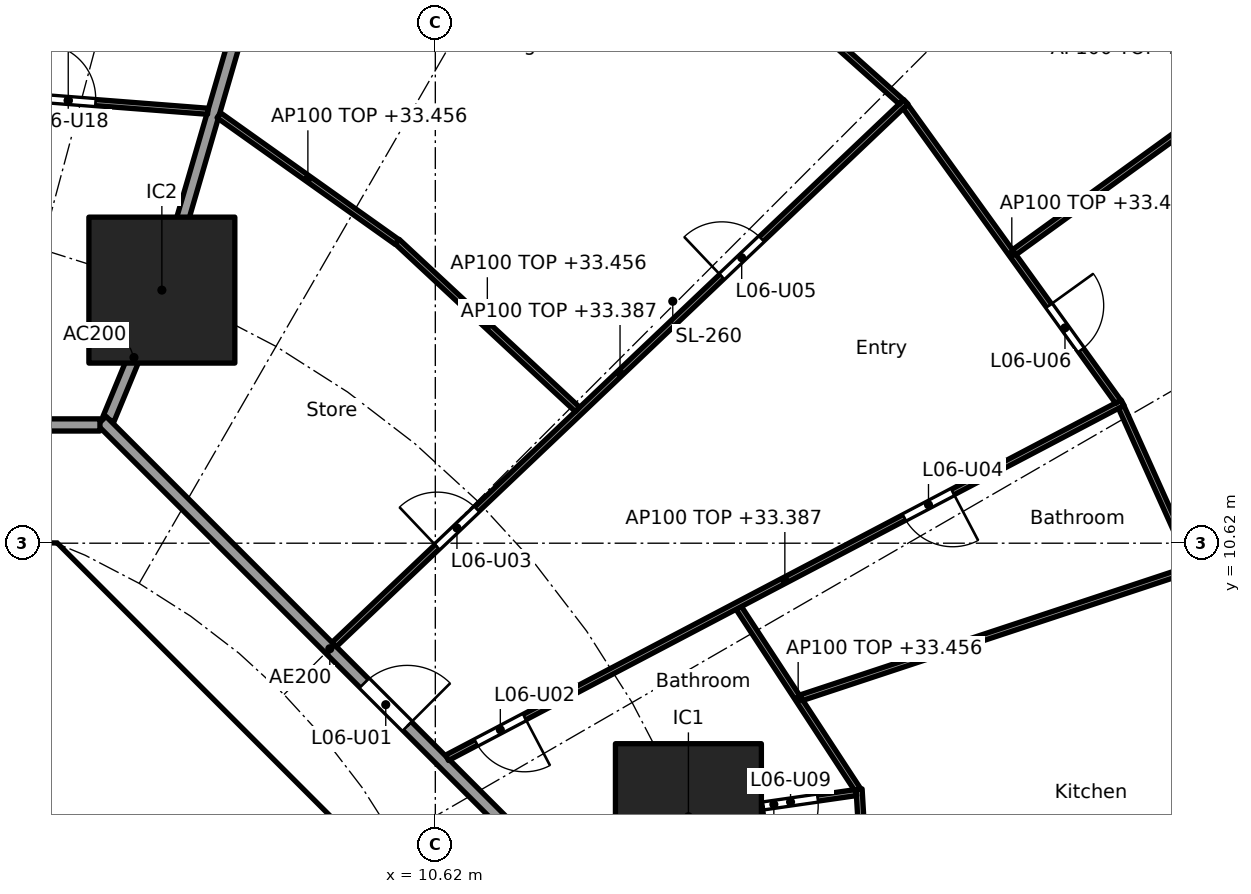
"""IFC4 building model, lengths in metres.
Left out: names, types, materials, properties, quantities, classifications, styles, units other than length and angle.
Written with IfcOpenShell. Run it as: python <this file> out.ifc"""

import sys

from ifc_helpers import new_model, si_unit, direction, frame, frame_2d, origin, origin_2d, place, context, subcontext, project, spatial, polyline, rectangle, outline, extrude, element, fill, save


model = new_model("IFC4")
c1 = context("Model", 3, precision=1e-05, world=origin(), true_north=direction((0.0, 1.0)))
c2 = subcontext(c1, "Body", "Model", "MODEL_VIEW")
j1 = project(units=[si_unit("LENGTHUNIT", "METRE"), si_unit("PLANEANGLEUNIT", "RADIAN")], contexts=[c1])
p1 = place(None, origin())
s1 = spatial("IfcSite", under=j1, at=p1, CompositionType="ELEMENT")
p2 = place(p1, origin())
s2 = spatial("IfcBuilding", under=s1, at=p2, CompositionType="ELEMENT")
p3 = place(p2, frame((0.0, 0.0, 30.7)))
s3 = spatial("IfcBuildingStorey", under=s2, at=p3, CompositionType="ELEMENT", Elevation=30.7)
for number, where, z_axis, x_axis in (
    (1, (14.782, 6.123, 0.0), (0.0, 0.0, 1.0), (1.0, 0.0, 0.0)),
    (2, (6.123, 14.782, 0.0), (0.0, 0.0, 1.0), (1.0, 0.0, 0.0)),
):
    element("IfcColumn", number, at=place(p3, frame(where, z_axis=z_axis, x_axis=x_axis)), inside=s3, PredefinedType="COLUMN", context=c2, shape_type="SweptSolid", body=[
        extrude(rectangle(XDim=2.4, YDim=2.4, at=origin_2d()), origin(), (0.0, 0.0, 1.0), 3.7),
    ])
p4 = place(p3, frame((9.988, 4.613, 0.0), z_axis=(0.0, 0.0, 1.0), x_axis=(-0.707106781187, 0.707106781187, 0.0)))
e3 = element("IfcWall", 3, at=p4, inside=s3, PredefinedType="SHEAR", context=c2, shape_type="SweptSolid", body=[
    extrude(rectangle(XDim=7.602, YDim=0.6, at=frame_2d((3.801, 0.0))), origin(), (0.0, 0.0, 1.0), 3.44),
])
p5 = place(p4, frame((3.201, 0.0, 0.0)))
e4 = element("IfcOpeningElement", 4, at=p5, cuts=e3, PredefinedType="OPENING", context=c2, shape_type="SweptSolid", body=[
    extrude(rectangle(XDim=1.2, YDim=2.1, at=frame_2d((0.6, 1.05))), frame((0.0, 0.31, 0.0), z_axis=(0.0, -1.0, 0.0), x_axis=(1.0, 0.0, 0.0)), (0.0, 0.0, 1.0), 0.62),
])
p6 = place(p3, origin())
e5 = element("IfcWall", 5, at=p6, inside=s3, PredefinedType="SHEAR", context=c2, shape_type="SweptSolid", body=[
    extrude(outline(polyline([(-4.152, 10.025), (-4.401, 9.776), (-4.825, 10.2), (-4.401, 10.625), (4.401, 10.625), (4.825, 10.2), (4.401, 9.776), (4.152, 10.025), (-4.152, 10.025)])), origin(), (0.0, 0.0, 1.0), 3.44),
])
p7 = place(p3, frame((5.243, 12.657, 0.0), z_axis=(0.0, 0.0, 1.0), x_axis=(0.382707856524, 0.923869415315, 0.0)))
e6 = element("IfcWall", 6, at=p7, inside=s3, PredefinedType="PARTITIONING", context=c2, shape_type="SweptSolid", body=[
    extrude(rectangle(XDim=2.2, YDim=0.2, at=frame_2d((1.1, 0.0))), origin(), (0.0, 0.0, 1.0), 3.44),
])
p8 = place(p3, frame((6.137, 14.83, 0.0), z_axis=(0.0, 0.0, 1.0), x_axis=(0.27985745069, 0.960041565399, 0.0)))
e7 = element("IfcWall", 7, at=p8, inside=s3, PredefinedType="PARTITIONING", context=c2, shape_type="SweptSolid", body=[
    extrude(rectangle(XDim=16.705, YDim=0.2, at=frame_2d((8.353, 0.0))), origin(), (0.0, 0.0, 1.0), 2.756),
])
p9 = place(p3, frame((12.635, 5.134, 0.0), z_axis=(0.0, 0.0, 1.0), x_axis=(-0.707106781187, 0.707106781187, 0.0)))
e8 = element("IfcWall", 8, at=p9, inside=s3, PredefinedType="PARTITIONING", context=c2, shape_type="SweptSolid", body=[
    extrude(rectangle(XDim=10.609, YDim=0.2, at=frame_2d((5.305, 0.0))), origin(), (0.0, 0.0, 1.0), 3.44),
])
p10 = place(p9, frame((3.503, 0.0, 0.0)))
e9 = element("IfcOpeningElement", 9, at=p10, cuts=e8, PredefinedType="OPENING", context=c2, shape_type="SweptSolid", body=[
    extrude(rectangle(XDim=1.0, YDim=2.1, at=frame_2d((0.5, 1.05))), frame((0.0, 0.11, 0.0), z_axis=(0.0, -1.0, 0.0), x_axis=(1.0, 0.0, 0.0)), (0.0, 0.0, 1.0), 0.22),
])
p11 = place(p3, frame((5.104, 12.565, 0.0), z_axis=(0.0, 0.0, 1.0), x_axis=(-1.0, 0.0, 0.0)))
e10 = element("IfcWall", 10, at=p11, inside=s3, PredefinedType="PARTITIONING", context=c2, shape_type="SweptSolid", body=[
    extrude(rectangle(XDim=10.409, YDim=0.2, at=frame_2d((5.205, 0.0))), origin(), (0.0, 0.0, 1.0), 3.44),
])
p12 = place(p11, frame((6.339, 0.0, 0.0)))
e11 = element("IfcOpeningElement", 11, at=p12, cuts=e10, PredefinedType="OPENING", context=c2, shape_type="SweptSolid", body=[
    extrude(rectangle(XDim=1.0, YDim=2.1, at=frame_2d((0.5, 1.05))), frame((0.0, 0.11, 0.0), z_axis=(0.0, -1.0, 0.0), x_axis=(1.0, 0.0, 0.0)), (0.0, 0.0, 1.0), 0.22),
])
p13 = place(p3, frame((17.971, 0.05, 0.0), z_axis=(0.0, 0.0, 1.0), x_axis=(-0.058476853647, 0.998288764631, 0.0)))
e12 = element("IfcWall", 12, at=p13, inside=s3, PredefinedType="PARTITIONING", context=c2, shape_type="SweptSolid", body=[
    extrude(rectangle(XDim=6.538, YDim=0.1, at=frame_2d((3.269, 0.0))), origin(), (0.0, 0.0, 1.0), 2.756),
])
p14 = place(p13, frame((1.159, 0.0, 0.0)))
e13 = element("IfcOpeningElement", 13, at=p14, cuts=e12, PredefinedType="OPENING", context=c2, shape_type="SweptSolid", body=[
    extrude(rectangle(XDim=0.9, YDim=2.1, at=frame_2d((0.45, 1.05))), frame((0.0, 0.06, 0.0), z_axis=(0.0, -1.0, 0.0), x_axis=(1.0, 0.0, 0.0)), (0.0, 0.0, 1.0), 0.12),
])
p15 = place(p3, frame((14.832, 6.13, 0.0), z_axis=(0.0, 0.0, 1.0), x_axis=(0.989840446863, 0.142182593007, 0.0)))
e14 = element("IfcWall", 14, at=p15, inside=s3, PredefinedType="PARTITIONING", context=c2, shape_type="SweptSolid", body=[
    extrude(rectangle(XDim=2.739, YDim=0.1, at=frame_2d((1.369, 0.0))), origin(), (0.0, 0.0, 1.0), 3.44),
])
p16 = place(p15, frame((1.197, 0.0, 0.0)))
e15 = element("IfcOpeningElement", 15, at=p16, cuts=e14, PredefinedType="OPENING", context=c2, shape_type="SweptSolid", body=[
    extrude(rectangle(XDim=0.9, YDim=2.1, at=frame_2d((0.45, 1.05))), frame((0.0, 0.06, 0.0), z_axis=(0.0, -1.0, 0.0), x_axis=(1.0, 0.0, 0.0)), (0.0, 0.0, 1.0), 0.12),
])
p17 = place(p3, frame((17.564, 6.569, 0.0), z_axis=(0.0, 0.0, 1.0), x_axis=(-0.547641765292, 0.836712911881, 0.0)))
e16 = element("IfcWall", 16, at=p17, inside=s3, PredefinedType="PARTITIONING", context=c2, shape_type="SweptSolid", body=[
    extrude(rectangle(XDim=3.57, YDim=0.1, at=frame_2d((1.785, 0.0))), origin(), (0.0, 0.0, 1.0), 2.756),
])
p18 = place(p3, frame((24.293, 7.538, 0.0), z_axis=(0.0, 0.0, 1.0), x_axis=(-0.410197710154, 0.911996622025, 0.0)))
e17 = element("IfcWall", 17, at=p18, inside=s3, PredefinedType="PARTITIONING", context=c2, shape_type="SweptSolid", body=[
    extrude(rectangle(XDim=5.837, YDim=0.1, at=frame_2d((2.918, 0.0))), origin(), (0.0, 0.0, 1.0), 2.756),
])
p19 = place(p3, frame((16.635, 8.078, 0.0), z_axis=(0.0, 0.0, 1.0), x_axis=(0.949412285442, 0.314032342684, 0.0)))
e18 = element("IfcWall", 18, at=p19, inside=s3, PredefinedType="PARTITIONING", context=c2, shape_type="SweptSolid", body=[
    extrude(rectangle(XDim=14.451, YDim=0.1, at=frame_2d((7.226, 0.0))), origin(), (0.0, 0.0, 1.0), 2.837),
])
p20 = place(p3, frame((10.813, 7.091, 0.0), z_axis=(0.0, 0.0, 1.0), x_axis=(0.885182649479, 0.465243674928, 0.0)))
e19 = element("IfcWall", 19, at=p20, inside=s3, PredefinedType="PARTITIONING", context=c2, shape_type="SweptSolid", body=[
    extrude(rectangle(XDim=12.551, YDim=0.1, at=frame_2d((6.275, 0.0))), origin(), (0.0, 0.0, 1.0), 2.687),
])
p21 = place(p20, frame((0.539, 0.0, 0.0)))
e20 = element("IfcOpeningElement", 20, at=p21, cuts=e19, PredefinedType="OPENING", context=c2, shape_type="SweptSolid", body=[
    extrude(rectangle(XDim=0.9, YDim=2.1, at=frame_2d((0.45, 1.05))), frame((0.0, 0.06, 0.0), z_axis=(0.0, -1.0, 0.0), x_axis=(1.0, 0.0, 0.0)), (0.0, 0.0, 1.0), 0.12),
])
p22 = place(p20, frame((8.494, 0.0, 0.0)))
e21 = element("IfcOpeningElement", 21, at=p22, cuts=e19, PredefinedType="OPENING", context=c2, shape_type="SweptSolid", body=[
    extrude(rectangle(XDim=0.9, YDim=2.1, at=frame_2d((0.45, 1.05))), frame((0.0, 0.06, 0.0), z_axis=(0.0, -1.0, 0.0), x_axis=(1.0, 0.0, 0.0)), (0.0, 0.0, 1.0), 0.12),
])
p23 = place(p3, frame((21.849, 12.948, 0.0), z_axis=(0.0, 0.0, 1.0), x_axis=(-0.584563700282, 0.811347817099, 0.0)))
e22 = element("IfcWall", 22, at=p23, inside=s3, PredefinedType="PARTITIONING", context=c2, shape_type="SweptSolid", body=[
    extrude(rectangle(XDim=5.984, YDim=0.1, at=frame_2d((2.992, 0.0))), origin(), (0.0, 0.0, 1.0), 2.756),
])
p24 = place(p23, frame((1.046, 0.0, 0.0)))
e23 = element("IfcOpeningElement", 23, at=p24, cuts=e22, PredefinedType="OPENING", context=c2, shape_type="SweptSolid", body=[
    extrude(rectangle(XDim=0.9, YDim=2.1, at=frame_2d((0.45, 1.05))), frame((0.0, 0.06, 0.0), z_axis=(0.0, -1.0, 0.0), x_axis=(1.0, 0.0, 0.0)), (0.0, 0.0, 1.0), 0.12),
])
p25 = place(p3, frame((20.141, 15.405, 0.0), z_axis=(0.0, 0.0, 1.0), x_axis=(0.809834895779, 0.58665785734, 0.0)))
e24 = element("IfcWall", 24, at=p25, inside=s3, PredefinedType="PARTITIONING", context=c2, shape_type="SweptSolid", body=[
    extrude(rectangle(XDim=7.945, YDim=0.1, at=frame_2d((3.973, 0.0))), origin(), (0.0, 0.0, 1.0), 2.837),
])
p26 = place(p3, frame((8.957, 8.953, 0.0), z_axis=(0.0, 0.0, 1.0), x_axis=(0.725250022034, 0.688485588476, 0.0)))
e25 = element("IfcWall", 25, at=p26, inside=s3, PredefinedType="PARTITIONING", context=c2, shape_type="SweptSolid", body=[
    extrude(rectangle(XDim=12.963, YDim=0.1, at=frame_2d((6.481, 0.0))), origin(), (0.0, 0.0, 1.0), 2.687),
])
p27 = place(p26, frame((2.333, 0.0, 0.0)))
e26 = element("IfcOpeningElement", 26, at=p27, cuts=e25, PredefinedType="OPENING", context=c2, shape_type="SweptSolid", body=[
    extrude(rectangle(XDim=0.9, YDim=2.1, at=frame_2d((0.45, 1.05))), frame((0.0, 0.06, 0.0), z_axis=(0.0, -1.0, 0.0), x_axis=(1.0, 0.0, 0.0)), (0.0, 0.0, 1.0), 0.12),
])
p28 = place(p26, frame((8.79, 0.0, 0.0)))
e27 = element("IfcOpeningElement", 27, at=p28, cuts=e25, PredefinedType="OPENING", context=c2, shape_type="SweptSolid", body=[
    extrude(rectangle(XDim=0.9, YDim=2.1, at=frame_2d((0.45, 1.05))), frame((0.0, 0.06, 0.0), z_axis=(0.0, -1.0, 0.0), x_axis=(1.0, 0.0, 0.0)), (0.0, 0.0, 1.0), 0.12),
])
p29 = place(p3, frame((12.958, 12.82, 0.0), z_axis=(0.0, 0.0, 1.0), x_axis=(-0.732028724098, 0.681273768096, 0.0)))
e28 = element("IfcWall", 28, at=p29, inside=s3, PredefinedType="PARTITIONING", context=c2, shape_type="SweptSolid", body=[
    extrude(rectangle(XDim=4.05, YDim=0.1, at=frame_2d((2.025, 0.0))), origin(), (0.0, 0.0, 1.0), 2.756),
])
p30 = place(p3, frame((18.285, 17.877, 0.0), z_axis=(0.0, 0.0, 1.0), x_axis=(-0.745806142791, 0.666163041136, 0.0)))
e29 = element("IfcWall", 29, at=p30, inside=s3, PredefinedType="PARTITIONING", context=c2, shape_type="SweptSolid", body=[
    extrude(rectangle(XDim=5.831, YDim=0.1, at=frame_2d((2.915, 0.0))), origin(), (0.0, 0.0, 1.0), 2.756),
])
p31 = place(p30, frame((2.465, 0.0, 0.0)))
e30 = element("IfcOpeningElement", 30, at=p31, cuts=e29, PredefinedType="OPENING", context=c2, shape_type="SweptSolid", body=[
    extrude(rectangle(XDim=0.9, YDim=2.1, at=frame_2d((0.45, 1.05))), frame((0.0, 0.06, 0.0), z_axis=(0.0, -1.0, 0.0), x_axis=(1.0, 0.0, 0.0)), (0.0, 0.0, 1.0), 0.12),
])
p32 = place(p3, frame((9.989, 15.574, 0.0), z_axis=(0.0, 0.0, 1.0), x_axis=(-0.81492039338, 0.57957290521, 0.0)))
e31 = element("IfcWall", 31, at=p32, inside=s3, PredefinedType="PARTITIONING", context=c2, shape_type="SweptSolid", body=[
    extrude(rectangle(XDim=3.594, YDim=0.1, at=frame_2d((1.797, 0.0))), origin(), (0.0, 0.0, 1.0), 2.756),
])
p33 = place(p3, frame((6.878, 17.723, 0.0), z_axis=(0.0, 0.0, 1.0), x_axis=(-0.99701850123, 0.077162868047, 0.0)))
e32 = element("IfcWall", 32, at=p33, inside=s3, PredefinedType="PARTITIONING", context=c2, shape_type="SweptSolid", body=[
    extrude(rectangle(XDim=4.604, YDim=0.1, at=frame_2d((2.302, 0.0))), origin(), (0.0, 0.0, 1.0), 2.756),
])
p34 = place(p33, frame((1.852, 0.0, 0.0)))
e33 = element("IfcOpeningElement", 33, at=p34, cuts=e32, PredefinedType="OPENING", context=c2, shape_type="SweptSolid", body=[
    extrude(rectangle(XDim=0.9, YDim=2.1, at=frame_2d((0.45, 1.05))), frame((0.0, 0.06, 0.0), z_axis=(0.0, -1.0, 0.0), x_axis=(1.0, 0.0, 0.0)), (0.0, 0.0, 1.0), 0.12),
])
p35 = place(p5, origin())
e34 = element("IfcDoor", 34, at=p35, inside=s3, OperationType="SINGLE_SWING_RIGHT", PredefinedType="DOOR", context=c2, shape_type="SweptSolid", body=[
    extrude(rectangle(XDim=1.2, YDim=2.1, at=frame_2d((0.6, 1.05))), frame((0.0, 0.025, 0.0), z_axis=(0.0, -1.0, 0.0), x_axis=(1.0, 0.0, 0.0)), (0.0, 0.0, 1.0), 0.05),
])
fill(e4, e34)
p36 = place(p10, frame((1.0, 0.0, 0.0), x_axis=(-1.0, 0.0, 0.0)))
e35 = element("IfcDoor", 35, at=p36, inside=s3, OperationType="SINGLE_SWING_RIGHT", PredefinedType="DOOR", context=c2, shape_type="SweptSolid", body=[
    extrude(rectangle(XDim=1.0, YDim=2.1, at=frame_2d((0.5, 1.05))), frame((0.0, 0.025, 0.0), z_axis=(0.0, -1.0, 0.0), x_axis=(1.0, 0.0, 0.0)), (0.0, 0.0, 1.0), 0.05),
])
fill(e9, e35)
p37 = place(p21, frame((0.9, 0.0, 0.0), x_axis=(-1.0, 0.0, 0.0)))
e36 = element("IfcDoor", 36, at=p37, inside=s3, OperationType="SINGLE_SWING_LEFT", PredefinedType="DOOR", context=c2, shape_type="SweptSolid", body=[
    extrude(rectangle(XDim=0.9, YDim=2.1, at=frame_2d((0.45, 1.05))), frame((0.0, 0.025, 0.0), z_axis=(0.0, -1.0, 0.0), x_axis=(1.0, 0.0, 0.0)), (0.0, 0.0, 1.0), 0.05),
])
fill(e20, e36)
p38 = place(p27, origin())
e37 = element("IfcDoor", 37, at=p38, inside=s3, OperationType="SINGLE_SWING_LEFT", PredefinedType="DOOR", context=c2, shape_type="SweptSolid", body=[
    extrude(rectangle(XDim=0.9, YDim=2.1, at=frame_2d((0.45, 1.05))), frame((0.0, 0.025, 0.0), z_axis=(0.0, -1.0, 0.0), x_axis=(1.0, 0.0, 0.0)), (0.0, 0.0, 1.0), 0.05),
])
fill(e26, e37)
p39 = place(p22, frame((0.9, 0.0, 0.0), x_axis=(-1.0, 0.0, 0.0)))
e38 = element("IfcDoor", 38, at=p39, inside=s3, OperationType="SINGLE_SWING_LEFT", PredefinedType="DOOR", context=c2, shape_type="SweptSolid", body=[
    extrude(rectangle(XDim=0.9, YDim=2.1, at=frame_2d((0.45, 1.05))), frame((0.0, 0.025, 0.0), z_axis=(0.0, -1.0, 0.0), x_axis=(1.0, 0.0, 0.0)), (0.0, 0.0, 1.0), 0.05),
])
fill(e21, e38)
p40 = place(p28, origin())
e39 = element("IfcDoor", 39, at=p40, inside=s3, OperationType="SINGLE_SWING_LEFT", PredefinedType="DOOR", context=c2, shape_type="SweptSolid", body=[
    extrude(rectangle(XDim=0.9, YDim=2.1, at=frame_2d((0.45, 1.05))), frame((0.0, 0.025, 0.0), z_axis=(0.0, -1.0, 0.0), x_axis=(1.0, 0.0, 0.0)), (0.0, 0.0, 1.0), 0.05),
])
fill(e27, e39)
p41 = place(p24, frame((0.9, 0.0, 0.0), x_axis=(-1.0, 0.0, 0.0)))
e40 = element("IfcDoor", 40, at=p41, inside=s3, OperationType="SINGLE_SWING_LEFT", PredefinedType="DOOR", context=c2, shape_type="SweptSolid", body=[
    extrude(rectangle(XDim=0.9, YDim=2.1, at=frame_2d((0.45, 1.05))), frame((0.0, 0.025, 0.0), z_axis=(0.0, -1.0, 0.0), x_axis=(1.0, 0.0, 0.0)), (0.0, 0.0, 1.0), 0.05),
])
fill(e23, e40)
p42 = place(p16, frame((0.9, 0.0, 0.0), x_axis=(-1.0, 0.0, 0.0)))
e41 = element("IfcDoor", 41, at=p42, inside=s3, OperationType="SINGLE_SWING_RIGHT", PredefinedType="DOOR", context=c2, shape_type="SweptSolid", body=[
    extrude(rectangle(XDim=0.9, YDim=2.1, at=frame_2d((0.45, 1.05))), frame((0.0, 0.025, 0.0), z_axis=(0.0, -1.0, 0.0), x_axis=(1.0, 0.0, 0.0)), (0.0, 0.0, 1.0), 0.05),
])
fill(e15, e41)
p43 = place(p34, frame((0.9, 0.0, 0.0), x_axis=(-1.0, 0.0, 0.0)))
e42 = element("IfcDoor", 42, at=p43, inside=s3, OperationType="SINGLE_SWING_LEFT", PredefinedType="DOOR", context=c2, shape_type="SweptSolid", body=[
    extrude(rectangle(XDim=0.9, YDim=2.1, at=frame_2d((0.45, 1.05))), frame((0.0, 0.025, 0.0), z_axis=(0.0, -1.0, 0.0), x_axis=(1.0, 0.0, 0.0)), (0.0, 0.0, 1.0), 0.05),
])
fill(e33, e42)
save(model, sys.argv[1])
